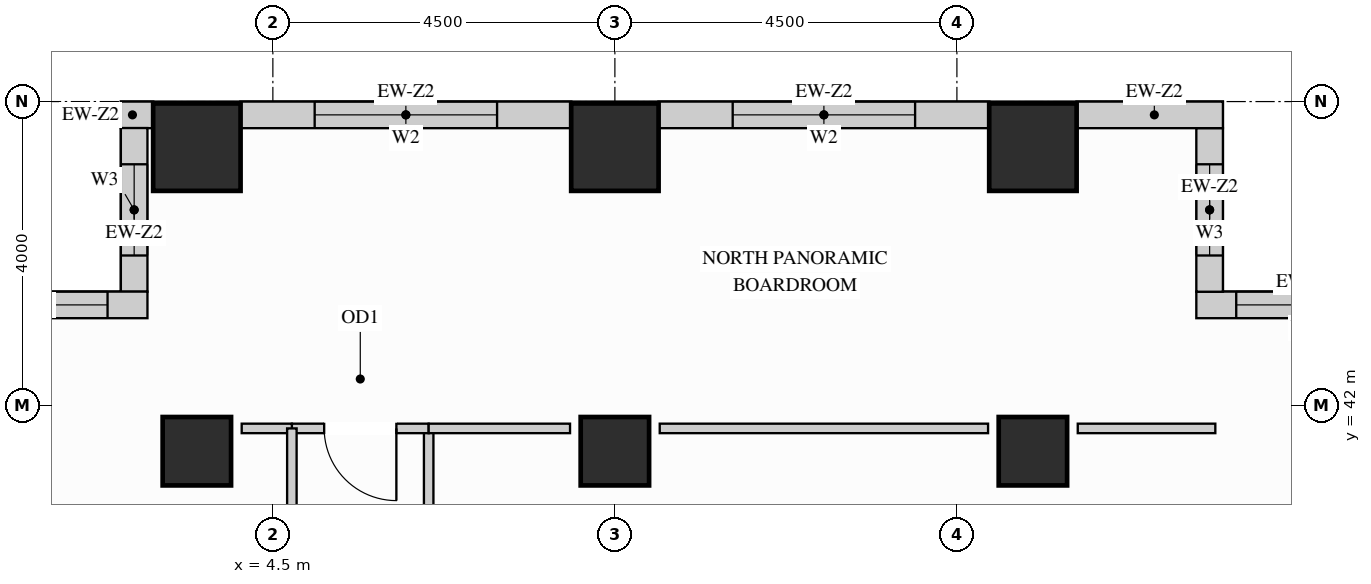
"""IFC4 building model, lengths in metres.
Left out: names, types, materials, properties, quantities, classifications, styles, units other than length and angle.
Written with IfcOpenShell. Run it as: python <this file> out.ifc"""

import sys

from ifc_helpers import new_model, si_unit, direction, frame, frame_2d, origin, origin_2d, place, context, subcontext, project, spatial, rectangle, extrude, source, transform, mapped, element, fill, save


model = new_model("IFC4")
c1 = context("Model", 3, precision=1e-05, world=origin(), true_north=direction((0.0, 1.0)))
c2 = subcontext(c1, "Body", "Model", "MODEL_VIEW")
j1 = project(units=[si_unit("LENGTHUNIT", "METRE"), si_unit("PLANEANGLEUNIT", "RADIAN")], contexts=[c1])
p1 = place(None, origin())
s1 = spatial("IfcSite", under=j1, at=p1, CompositionType="ELEMENT")
p2 = place(p1, origin())
s2 = spatial("IfcBuilding", under=s1, at=p2, CompositionType="ELEMENT")
p3 = place(p2, frame((0.0, 0.0, 120.6)))
s3 = spatial("IfcBuildingStorey", under=s2, at=p3, CompositionType="ELEMENT", Elevation=120.6)
m1 = source(origin(), c2, "Body", "SweptSolid", [
    extrude(rectangle(XDim=0.9, YDim=0.9, at=origin_2d()), origin(), (0.0, 0.0, 1.0), 3.38),
])
for number, where, z_axis, x_axis in (
    (1, (14.5, 41.4, 0.0), (0.0, 0.0, 1.0), (1.0, 0.0, 0.0)),
    (2, (3.5, 41.4, 0.0), (0.0, 0.0, 1.0), (1.0, 0.0, 0.0)),
    (3, (9.0, 41.4, 0.0), (0.0, 0.0, 1.0), (1.0, 0.0, 0.0)),
):
    element("IfcColumn", number, at=place(p3, frame(where, z_axis=z_axis, x_axis=x_axis)), inside=s3, PredefinedType="COLUMN", context=c2, shape_type="MappedRepresentation", body=[
        mapped(m1, transform((0.0, 0.0, 0.0), x_axis=(1.0, 0.0, 0.0), y_axis=(0.0, 1.0, 0.0), z_axis=(0.0, 0.0, 1.0))),
    ])
m2 = source(origin(), c2, "Body", "SweptSolid", [
    extrude(rectangle(XDim=1.15, YDim=1.15, at=origin_2d()), origin(), (0.0, 0.0, 1.0), 3.38),
])
for number, where, z_axis, x_axis in (
    (4, (14.5, 45.4, 0.0), (0.0, 0.0, 1.0), (1.0, 0.0, 0.0)),
    (5, (3.5, 45.4, 0.0), (0.0, 0.0, 1.0), (1.0, 0.0, 0.0)),
    (6, (9.0, 45.4, 0.0), (0.0, 0.0, 1.0), (1.0, 0.0, 0.0)),
):
    element("IfcColumn", number, at=place(p3, frame(where, z_axis=z_axis, x_axis=x_axis)), inside=s3, PredefinedType="COLUMN", context=c2, shape_type="MappedRepresentation", body=[
        mapped(m2, transform((0.0, 0.0, 0.0), x_axis=(1.0, 0.0, 0.0), y_axis=(0.0, 1.0, 0.0), z_axis=(0.0, 0.0, 1.0))),
    ])
p4 = place(p3, frame((19.5, 43.325, 0.0), z_axis=(0.0, 0.0, 1.0), x_axis=(-1.0, 0.0, 0.0)))
e7 = element("IfcWall", 7, at=p4, inside=s3, PredefinedType="SOLIDWALL", context=c2, shape_type="SweptSolid", body=[
    extrude(rectangle(XDim=2.85, YDim=0.35, at=frame_2d((1.425, 0.0))), origin(), (0.0, 0.0, 1.0), 3.365),
])
p5 = place(p4, frame((0.525, 0.0, 0.78)))
e8 = element("IfcOpeningElement", 8, at=p5, cuts=e7, PredefinedType="OPENING", context=c2, shape_type="SweptSolid", body=[
    extrude(rectangle(XDim=1.8, YDim=2.1, at=frame_2d((0.9, 1.05))), frame((0.0, 0.185, 0.0), z_axis=(0.0, -1.0, 0.0), x_axis=(1.0, 0.0, 0.0)), (0.0, 0.0, 1.0), 0.37),
])
p6 = place(p3, frame((16.825, 43.498, 0.0), z_axis=(0.0, 0.0, 1.0), x_axis=(0.0, 1.0, 0.0)))
e9 = element("IfcWall", 9, at=p6, inside=s3, PredefinedType="SOLIDWALL", context=c2, shape_type="SweptSolid", body=[
    extrude(rectangle(XDim=2.154, YDim=0.35, at=frame_2d((1.077, 0.0))), origin(), (0.0, 0.0, 1.0), 3.365),
])
p7 = place(p6, frame((0.477, 0.0, 0.78)))
e10 = element("IfcOpeningElement", 10, at=p7, cuts=e9, PredefinedType="OPENING", context=c2, shape_type="SweptSolid", body=[
    extrude(rectangle(XDim=1.2, YDim=2.1, at=frame_2d((0.6, 1.05))), frame((0.0, 0.185, 0.0), z_axis=(0.0, -1.0, 0.0), x_axis=(1.0, 0.0, 0.0)), (0.0, 0.0, 1.0), 0.37),
])
m3 = source(origin(), c2, "Body", "SweptSolid", [
    extrude(rectangle(XDim=1.927, YDim=0.35, at=frame_2d((0.963, 0.0))), origin(), (0.0, 0.0, 1.0), 3.365),
])
p8 = place(p3, frame((17.0, 45.825, 0.0), z_axis=(0.0, 0.0, 1.0), x_axis=(-1.0, 0.0, 0.0)))
e11 = element("IfcWall", 11, at=p8, inside=s3, PredefinedType="SOLIDWALL", context=c2, shape_type="MappedRepresentation", body=[
    mapped(m3, transform((0.0, 0.0, 0.0), x_axis=(1.0, 0.0, 0.0), y_axis=(0.0, 1.0, 0.0), z_axis=(0.0, 0.0, 1.0))),
])
p9 = place(p3, frame((13.927, 45.825, 0.0), z_axis=(0.0, 0.0, 1.0), x_axis=(-1.0, 0.0, 0.0)))
e12 = element("IfcWall", 12, at=p9, inside=s3, PredefinedType="SOLIDWALL", context=c2, shape_type="SweptSolid", body=[
    extrude(rectangle(XDim=4.354, YDim=0.35, at=frame_2d((2.177, 0.0))), origin(), (0.0, 0.0, 1.0), 3.365),
])
p10 = place(p9, frame((0.977, 0.0, 0.78)))
e13 = element("IfcOpeningElement", 13, at=p10, cuts=e12, PredefinedType="OPENING", context=c2, shape_type="SweptSolid", body=[
    extrude(rectangle(XDim=2.4, YDim=2.1, at=frame_2d((1.2, 1.05))), frame((0.0, 0.185, 0.0), z_axis=(0.0, -1.0, 0.0), x_axis=(1.0, 0.0, 0.0)), (0.0, 0.0, 1.0), 0.37),
])
p11 = place(p3, frame((8.427, 45.825, 0.0), z_axis=(0.0, 0.0, 1.0), x_axis=(-1.0, 0.0, 0.0)))
e14 = element("IfcWall", 14, at=p11, inside=s3, PredefinedType="SOLIDWALL", context=c2, shape_type="SweptSolid", body=[
    extrude(rectangle(XDim=4.354, YDim=0.35, at=frame_2d((2.177, 0.0))), origin(), (0.0, 0.0, 1.0), 3.365),
])
p12 = place(p11, frame((0.977, 0.0, 0.78)))
e15 = element("IfcOpeningElement", 15, at=p12, cuts=e14, PredefinedType="OPENING", context=c2, shape_type="SweptSolid", body=[
    extrude(rectangle(XDim=2.4, YDim=2.1, at=frame_2d((1.2, 1.05))), frame((0.0, 0.185, 0.0), z_axis=(0.0, -1.0, 0.0), x_axis=(1.0, 0.0, 0.0)), (0.0, 0.0, 1.0), 0.37),
])
m4 = source(origin(), c2, "Body", "SweptSolid", [
    extrude(rectangle(XDim=0.427, YDim=0.35, at=frame_2d((0.213, 0.0))), origin(), (0.0, 0.0, 1.0), 3.365),
])
p13 = place(p3, frame((2.927, 45.825, 0.0), z_axis=(0.0, 0.0, 1.0), x_axis=(-1.0, 0.0, 0.0)))
e16 = element("IfcWall", 16, at=p13, inside=s3, PredefinedType="SOLIDWALL", context=c2, shape_type="MappedRepresentation", body=[
    mapped(m4, transform((0.0, 0.0, 0.0), x_axis=(1.0, 0.0, 0.0), y_axis=(0.0, 1.0, 0.0), z_axis=(0.0, 0.0, 1.0))),
])
p14 = place(p3, frame((2.675, 45.652, 0.0), z_axis=(0.0, 0.0, 1.0), x_axis=(0.0, -1.0, 0.0)))
e17 = element("IfcWall", 17, at=p14, inside=s3, PredefinedType="SOLIDWALL", context=c2, shape_type="SweptSolid", body=[
    extrude(rectangle(XDim=2.154, YDim=0.35, at=frame_2d((1.077, 0.0))), origin(), (0.0, 0.0, 1.0), 3.365),
])
p15 = place(p14, frame((0.477, 0.0, 0.78)))
e18 = element("IfcOpeningElement", 18, at=p15, cuts=e17, PredefinedType="OPENING", context=c2, shape_type="SweptSolid", body=[
    extrude(rectangle(XDim=1.2, YDim=2.1, at=frame_2d((0.6, 1.05))), frame((0.0, 0.185, 0.0), z_axis=(0.0, -1.0, 0.0), x_axis=(1.0, 0.0, 0.0)), (0.0, 0.0, 1.0), 0.37),
])
p16 = place(p3, frame((2.85, 43.325, 0.0), z_axis=(0.0, 0.0, 1.0), x_axis=(-1.0, 0.0, 0.0)))
e19 = element("IfcWall", 19, at=p16, inside=s3, PredefinedType="SOLIDWALL", context=c2, shape_type="SweptSolid", body=[
    extrude(rectangle(XDim=2.85, YDim=0.35, at=frame_2d((1.425, 0.0))), origin(), (0.0, 0.0, 1.0), 3.365),
])
p17 = place(p16, frame((0.525, 0.0, 0.78)))
e20 = element("IfcOpeningElement", 20, at=p17, cuts=e19, PredefinedType="OPENING", context=c2, shape_type="SweptSolid", body=[
    extrude(rectangle(XDim=1.8, YDim=2.1, at=frame_2d((0.9, 1.05))), frame((0.0, 0.185, 0.0), z_axis=(0.0, -1.0, 0.0), x_axis=(1.0, 0.0, 0.0)), (0.0, 0.0, 1.0), 0.37),
])
p18 = place(p3, frame((6.55, 37.077, 0.0), z_axis=(0.0, 0.0, 1.0), x_axis=(0.0, 1.0, 0.0)))
e21 = element("IfcWall", 21, at=p18, inside=s3, PredefinedType="PARTITIONING", context=c2, shape_type="SweptSolid", body=[
    extrude(rectangle(XDim=4.623, YDim=0.125, at=frame_2d((2.312, 0.0))), origin(), (0.0, 0.0, 1.0), 3.365),
])
p19 = place(p18, frame((1.836, 0.0, 0.0)))
e22 = element("IfcOpeningElement", 22, at=p19, cuts=e21, PredefinedType="OPENING", context=c2, shape_type="SweptSolid", body=[
    extrude(rectangle(XDim=0.95, YDim=2.15, at=frame_2d((0.475, 1.075))), frame((0.0, 0.073, 0.0), z_axis=(0.0, -1.0, 0.0), x_axis=(1.0, 0.0, 0.0)), (0.0, 0.0, 1.0), 0.145),
])
p20 = place(p3, frame((4.75, 41.7, 0.0), z_axis=(0.0, 0.0, 1.0), x_axis=(1.0, 0.0, 0.0)))
e23 = element("IfcWall", 23, at=p20, inside=s3, PredefinedType="PARTITIONING", context=c2, shape_type="SweptSolid", body=[
    extrude(rectangle(XDim=1.8, YDim=0.125, at=frame_2d((0.9, 0.0))), origin(), (0.0, 0.0, 1.0), 3.365),
])
p21 = place(p20, frame((0.425, 0.0, 0.0)))
e24 = element("IfcOpeningElement", 24, at=p21, cuts=e23, PredefinedType="OPENING", context=c2, shape_type="SweptSolid", body=[
    extrude(rectangle(XDim=0.95, YDim=2.15, at=frame_2d((0.475, 1.075))), frame((0.0, 0.073, 0.0), z_axis=(0.0, -1.0, 0.0), x_axis=(1.0, 0.0, 0.0)), (0.0, 0.0, 1.0), 0.145),
])
m5 = source(origin(), c2, "Body", "SweptSolid", [
    extrude(rectangle(XDim=1.86, YDim=0.125, at=frame_2d((0.93, 0.0))), origin(), (0.0, 0.0, 1.0), 3.365),
])
p22 = place(p3, frame((6.55, 41.7, 0.0), z_axis=(0.0, 0.0, 1.0), x_axis=(1.0, 0.0, 0.0)))
e25 = element("IfcWall", 25, at=p22, inside=s3, PredefinedType="PARTITIONING", context=c2, shape_type="MappedRepresentation", body=[
    mapped(m5, transform((0.0, 0.0, 0.0), x_axis=(1.0, 0.0, 0.0), y_axis=(0.0, 1.0, 0.0), z_axis=(0.0, 0.0, 1.0))),
])
m6 = source(origin(), c2, "Body", "SweptSolid", [
    extrude(rectangle(XDim=4.32, YDim=0.125, at=frame_2d((2.16, 0.0))), origin(), (0.0, 0.0, 1.0), 3.365),
])
p23 = place(p3, frame((9.59, 41.7, 0.0), z_axis=(0.0, 0.0, 1.0), x_axis=(1.0, 0.0, 0.0)))
e26 = element("IfcWall", 26, at=p23, inside=s3, PredefinedType="PARTITIONING", context=c2, shape_type="MappedRepresentation", body=[
    mapped(m6, transform((0.0, 0.0, 0.0), x_axis=(1.0, 0.0, 0.0), y_axis=(0.0, 1.0, 0.0), z_axis=(0.0, 0.0, 1.0))),
])
m7 = source(origin(), c2, "Body", "SweptSolid", [
    extrude(rectangle(XDim=1.81, YDim=0.125, at=frame_2d((0.905, 0.0))), origin(), (0.0, 0.0, 1.0), 3.365),
])
p24 = place(p3, frame((15.09, 41.7, 0.0), z_axis=(0.0, 0.0, 1.0), x_axis=(1.0, 0.0, 0.0)))
e27 = element("IfcWall", 27, at=p24, inside=s3, PredefinedType="PARTITIONING", context=c2, shape_type="MappedRepresentation", body=[
    mapped(m7, transform((0.0, 0.0, 0.0), x_axis=(1.0, 0.0, 0.0), y_axis=(0.0, 1.0, 0.0), z_axis=(0.0, 0.0, 1.0))),
])
m8 = source(origin(), c2, "Body", "SweptSolid", [
    extrude(rectangle(XDim=0.66, YDim=0.125, at=frame_2d((0.33, 0.0))), origin(), (0.0, 0.0, 1.0), 3.365),
])
p25 = place(p3, frame((4.09, 41.7, 0.0), z_axis=(0.0, 0.0, 1.0), x_axis=(1.0, 0.0, 0.0)))
e28 = element("IfcWall", 28, at=p25, inside=s3, PredefinedType="PARTITIONING", context=c2, shape_type="MappedRepresentation", body=[
    mapped(m8, transform((0.0, 0.0, 0.0), x_axis=(1.0, 0.0, 0.0), y_axis=(0.0, 1.0, 0.0), z_axis=(0.0, 0.0, 1.0))),
])
p26 = place(p3, frame((4.75, 31.65, 0.0), z_axis=(0.0, 0.0, 1.0), x_axis=(0.0, 1.0, 0.0)))
e29 = element("IfcWall", 29, at=p26, inside=s3, PredefinedType="PARTITIONING", context=c2, shape_type="SweptSolid", body=[
    extrude(rectangle(XDim=10.05, YDim=0.125, at=frame_2d((5.025, 0.0))), origin(), (0.0, 0.0, 1.0), 3.365),
])
p27 = place(p26, frame((4.245, 0.0, 0.0)))
e30 = element("IfcOpeningElement", 30, at=p27, cuts=e29, PredefinedType="OPENING", context=c2, shape_type="SweptSolid", body=[
    extrude(rectangle(XDim=0.95, YDim=2.15, at=frame_2d((0.475, 1.075))), frame((0.0, 0.073, 0.0), z_axis=(0.0, -1.0, 0.0), x_axis=(1.0, 0.0, 0.0)), (0.0, 0.0, 1.0), 0.145),
])
m9 = source(origin(), c2, "Body", "SweptSolid", [
    extrude(rectangle(XDim=0.95, YDim=2.15, at=frame_2d((0.475, 1.075))), frame((0.0, 0.025, 0.0), z_axis=(0.0, -1.0, 0.0), x_axis=(1.0, 0.0, 0.0)), (0.0, 0.0, 1.0), 0.05),
])
p28 = place(p21, origin())
e31 = element("IfcDoor", 31, at=p28, inside=s3, OperationType="SINGLE_SWING_RIGHT", PredefinedType="DOOR", context=c2, shape_type="MappedRepresentation", body=[
    mapped(m9, transform((0.0, 0.0, 0.0), x_axis=(1.0, 0.0, 0.0), y_axis=(0.0, 1.0, 0.0), z_axis=(0.0, 0.0, 1.0))),
])
fill(e24, e31)
m10 = source(origin(), c2, "Body", "SweptSolid", [
    extrude(rectangle(XDim=1.8, YDim=2.1, at=frame_2d((0.9, 1.05))), frame((0.0, 0.03, 0.0), z_axis=(0.0, -1.0, 0.0), x_axis=(1.0, 0.0, 0.0)), (0.0, 0.0, 1.0), 0.06),
])
p29 = place(p5, origin())
e32 = element("IfcWindow", 32, at=p29, inside=s3, PartitioningType="SINGLE_PANEL", PredefinedType="WINDOW", context=c2, shape_type="MappedRepresentation", body=[
    mapped(m10, transform((0.0, 0.0, 0.0), x_axis=(1.0, 0.0, 0.0), y_axis=(0.0, 1.0, 0.0), z_axis=(0.0, 0.0, 1.0))),
])
fill(e8, e32)
p30 = place(p17, origin())
e33 = element("IfcWindow", 33, at=p30, inside=s3, PartitioningType="SINGLE_PANEL", PredefinedType="WINDOW", context=c2, shape_type="MappedRepresentation", body=[
    mapped(m10, transform((0.0, 0.0, 0.0), x_axis=(1.0, 0.0, 0.0), y_axis=(0.0, 1.0, 0.0), z_axis=(0.0, 0.0, 1.0))),
])
fill(e20, e33)
m11 = source(origin(), c2, "Body", "SweptSolid", [
    extrude(rectangle(XDim=2.4, YDim=2.1, at=frame_2d((1.2, 1.05))), frame((0.0, 0.03, 0.0), z_axis=(0.0, -1.0, 0.0), x_axis=(1.0, 0.0, 0.0)), (0.0, 0.0, 1.0), 0.06),
])
p31 = place(p10, origin())
e34 = element("IfcWindow", 34, at=p31, inside=s3, PartitioningType="SINGLE_PANEL", PredefinedType="WINDOW", context=c2, shape_type="MappedRepresentation", body=[
    mapped(m11, transform((0.0, 0.0, 0.0), x_axis=(1.0, 0.0, 0.0), y_axis=(0.0, 1.0, 0.0), z_axis=(0.0, 0.0, 1.0))),
])
fill(e13, e34)
p32 = place(p12, origin())
e35 = element("IfcWindow", 35, at=p32, inside=s3, PartitioningType="SINGLE_PANEL", PredefinedType="WINDOW", context=c2, shape_type="MappedRepresentation", body=[
    mapped(m11, transform((0.0, 0.0, 0.0), x_axis=(1.0, 0.0, 0.0), y_axis=(0.0, 1.0, 0.0), z_axis=(0.0, 0.0, 1.0))),
])
fill(e15, e35)
m12 = source(origin(), c2, "Body", "SweptSolid", [
    extrude(rectangle(XDim=1.2, YDim=2.1, at=frame_2d((0.6, 1.05))), frame((0.0, 0.03, 0.0), z_axis=(0.0, -1.0, 0.0), x_axis=(1.0, 0.0, 0.0)), (0.0, 0.0, 1.0), 0.06),
])
p33 = place(p7, origin())
e36 = element("IfcWindow", 36, at=p33, inside=s3, PartitioningType="SINGLE_PANEL", PredefinedType="WINDOW", context=c2, shape_type="MappedRepresentation", body=[
    mapped(m12, transform((0.0, 0.0, 0.0), x_axis=(1.0, 0.0, 0.0), y_axis=(0.0, 1.0, 0.0), z_axis=(0.0, 0.0, 1.0))),
])
fill(e10, e36)
p34 = place(p15, origin())
e37 = element("IfcWindow", 37, at=p34, inside=s3, PartitioningType="SINGLE_PANEL", PredefinedType="WINDOW", context=c2, shape_type="MappedRepresentation", body=[
    mapped(m12, transform((0.0, 0.0, 0.0), x_axis=(1.0, 0.0, 0.0), y_axis=(0.0, 1.0, 0.0), z_axis=(0.0, 0.0, 1.0))),
])
fill(e18, e37)
save(model, sys.argv[1])
